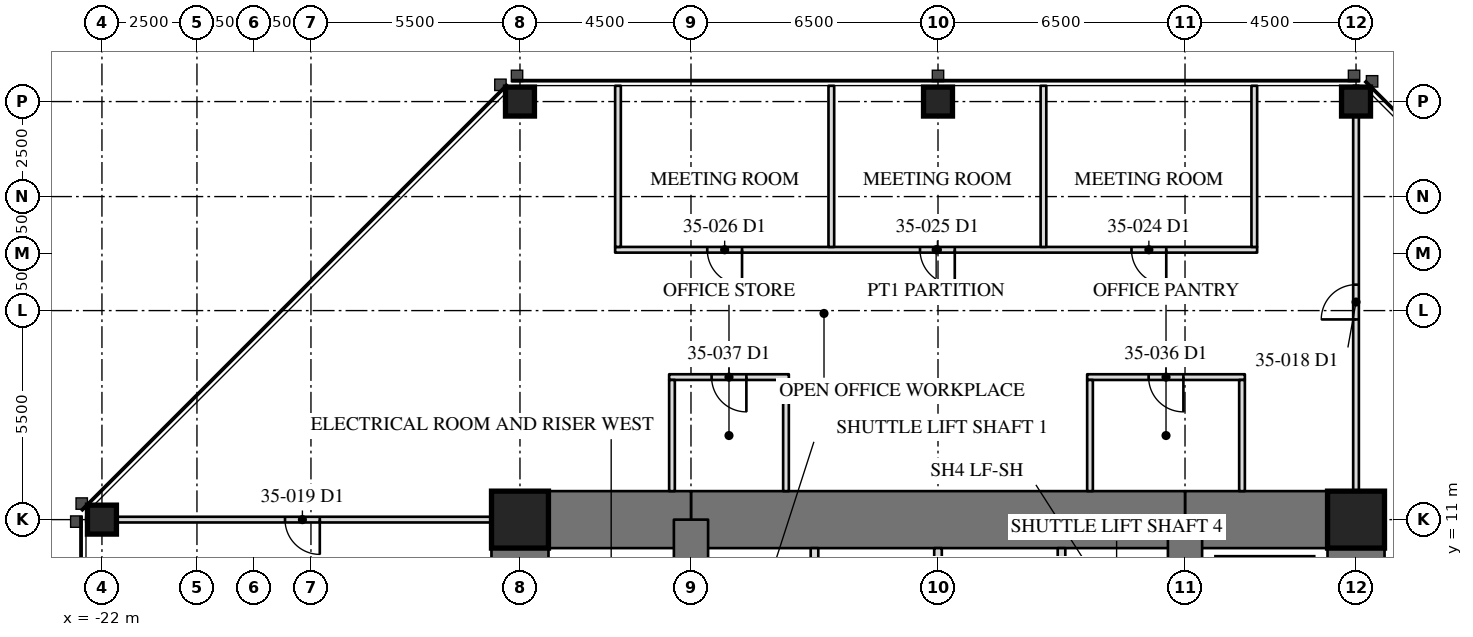
"""IFC4 building model, lengths in metres.
Left out: names, types, materials, properties, quantities, classifications, styles, units other than length and angle.
Written with IfcOpenShell. Run it as: python <this file> out.ifc"""

import sys

from ifc_helpers import new_model, si_unit, direction, frame, frame_2d, origin, origin_2d, place, context, subcontext, project, spatial, rectangle, hollow_rectangle, extrude, element, fill, save


model = new_model("IFC4")
c1 = context("Model", 3, precision=1e-05, world=origin(), true_north=direction((0.0, 1.0)))
c2 = subcontext(c1, "Body", "Model", "MODEL_VIEW")
j1 = project(units=[si_unit("LENGTHUNIT", "METRE"), si_unit("PLANEANGLEUNIT", "RADIAN")], contexts=[c1])
p1 = place(None, origin())
s1 = spatial("IfcSite", under=j1, at=p1, CompositionType="ELEMENT")
p2 = place(p1, origin())
s2 = spatial("IfcBuilding", under=s1, at=p2, CompositionType="ELEMENT")
p3 = place(p2, frame((0.0, 0.0, 150.0)))
s3 = spatial("IfcBuildingStorey", under=s2, at=p3, CompositionType="ELEMENT", Elevation=150.0)
for number, where, z_axis, x_axis in (
    (1, (11.0, 22.0, 0.0), (0.0, 0.0, 1.0), (1.0, 0.0, 0.0)),
    (2, (0.0, 22.0, 0.0), (0.0, 0.0, 1.0), (1.0, 0.0, 0.0)),
    (3, (-11.0, 22.0, 0.0), (0.0, 0.0, 1.0), (1.0, 0.0, 0.0)),
    (4, (-22.0, 11.0, 0.0), (0.0, 0.0, 1.0), (0.0, 1.0, 0.0)),
):
    element("IfcColumn", number, at=place(p3, frame(where, z_axis=z_axis, x_axis=x_axis)), inside=s3, PredefinedType="COLUMN", context=c2, shape_type="SweptSolid", body=[
        extrude(hollow_rectangle(XDim=0.762, YDim=0.762, WallThickness=0.076, at=origin_2d()), origin(), (0.0, 0.0, 1.0), 4.1),
    ])
p4 = place(p3, frame((11.0, -11.0, 0.0), z_axis=(0.0, 0.0, 1.0), x_axis=(0.0, 1.0, 0.0)))
e5 = element("IfcWall", 5, at=p4, inside=s3, PredefinedType="SHEAR", context=c2, shape_type="SweptSolid", body=[
    extrude(rectangle(XDim=22.0, YDim=1.5, at=frame_2d((11.0, 0.0))), origin(), (0.0, 0.0, 1.0), 4.1),
])
p5 = place(p4, frame((15.393, 0.0, 0.0)))
e6 = element("IfcOpeningElement", 6, at=p5, cuts=e5, PredefinedType="OPENING", context=c2, shape_type="SweptSolid", body=[
    extrude(rectangle(XDim=0.915, YDim=2.134, at=frame_2d((0.458, 1.067))), frame((0.0, 0.76, 0.0), z_axis=(0.0, -1.0, 0.0), x_axis=(1.0, 0.0, 0.0)), (0.0, 0.0, 1.0), 1.52),
])
p6 = place(p3, frame((-11.0, 11.0, 0.0), z_axis=(0.0, 0.0, 1.0), x_axis=(0.0, -1.0, 0.0)))
e7 = element("IfcWall", 7, at=p6, inside=s3, PredefinedType="SHEAR", context=c2, shape_type="SweptSolid", body=[
    extrude(rectangle(XDim=22.0, YDim=1.5, at=frame_2d((11.0, 0.0))), origin(), (0.0, 0.0, 1.0), 4.1),
])
p7 = place(p6, frame((15.393, 0.0, 0.0)))
e8 = element("IfcOpeningElement", 8, at=p7, cuts=e7, PredefinedType="OPENING", context=c2, shape_type="SweptSolid", body=[
    extrude(rectangle(XDim=0.915, YDim=2.134, at=frame_2d((0.458, 1.067))), frame((0.0, 0.76, 0.0), z_axis=(0.0, -1.0, 0.0), x_axis=(1.0, 0.0, 0.0)), (0.0, 0.0, 1.0), 1.52),
])
p8 = place(p3, frame((11.0, 11.0, 0.0), z_axis=(0.0, 0.0, 1.0), x_axis=(-1.0, 0.0, 0.0)))
e9 = element("IfcWall", 9, at=p8, inside=s3, PredefinedType="SHEAR", context=c2, shape_type="SweptSolid", body=[
    extrude(rectangle(XDim=4.5, YDim=1.5, at=frame_2d((2.25, 0.0))), origin(), (0.0, 0.0, 1.0), 4.1),
])
p9 = place(p3, frame((6.5, 11.0, 0.0), z_axis=(0.0, 0.0, 1.0), x_axis=(-1.0, 0.0, 0.0)))
e10 = element("IfcWall", 10, at=p9, inside=s3, PredefinedType="SHEAR", context=c2, shape_type="SweptSolid", body=[
    extrude(rectangle(XDim=13.0, YDim=1.5, at=frame_2d((6.5, 0.0))), origin(), (0.0, 0.0, 1.0), 4.1),
])
p10 = place(p3, frame((-6.5, 11.0, 0.0), z_axis=(0.0, 0.0, 1.0), x_axis=(-1.0, 0.0, 0.0)))
e11 = element("IfcWall", 11, at=p10, inside=s3, PredefinedType="SHEAR", context=c2, shape_type="SweptSolid", body=[
    extrude(rectangle(XDim=4.5, YDim=1.5, at=frame_2d((2.25, 0.0))), origin(), (0.0, 0.0, 1.0), 4.1),
])
for number, where, z_axis, x_axis in (
    (12, (6.5, 6.5, 0.0), (0.0, 0.0, 1.0), (0.0, 1.0, 0.0)),
    (13, (-6.5, 11.0, 0.0), (0.0, 0.0, 1.0), (0.0, -1.0, 0.0)),
):
    element("IfcWall", number, at=place(p3, frame(where, z_axis=z_axis, x_axis=x_axis)), inside=s3, PredefinedType="SHEAR", context=c2, shape_type="SweptSolid", body=[
        extrude(rectangle(XDim=4.5, YDim=0.9, at=frame_2d((2.25, 0.0))), origin(), (0.0, 0.0, 1.0), 4.1),
    ])
for number, where, z_axis, x_axis in (
    (14, (11.0, 11.0, 0.0), (0.0, 0.0, 1.0), (1.0, 0.0, 0.0)),
    (15, (-11.0, 11.0, 0.0), (0.0, 0.0, 1.0), (1.0, 0.0, 0.0)),
):
    element("IfcColumn", number, at=place(p3, frame(where, z_axis=z_axis, x_axis=x_axis)), inside=s3, PredefinedType="COLUMN", context=c2, shape_type="SweptSolid", body=[
        extrude(hollow_rectangle(XDim=1.499, YDim=1.499, WallThickness=0.102, at=origin_2d()), origin(), (0.0, 0.0, 1.0), 4.1),
    ])
for number, where, z_axis, x_axis in (
    (16, (-3.25, 6.95, 0.0), (0.0, 0.0, 1.0), (0.0, 1.0, 0.0)),
    (17, (0.0, 6.95, 0.0), (0.0, 0.0, 1.0), (0.0, 1.0, 0.0)),
    (18, (3.25, 6.95, 0.0), (0.0, 0.0, 1.0), (0.0, 1.0, 0.0)),
):
    element("IfcWall", number, at=place(p3, frame(where, z_axis=z_axis, x_axis=x_axis)), inside=s3, PredefinedType="PARTITIONING", context=c2, shape_type="SweptSolid", body=[
        extrude(rectangle(XDim=3.3, YDim=0.2, at=frame_2d((1.65, 0.0))), origin(), (0.0, 0.0, 1.0), 3.91),
    ])
p11 = place(p3, frame((11.0, 11.75, 0.0), z_axis=(0.0, 0.0, 1.0), x_axis=(0.0, 1.0, 0.0)))
e19 = element("IfcWall", 19, at=p11, inside=s3, PredefinedType="PARTITIONING", context=c2, shape_type="SweptSolid", body=[
    extrude(rectangle(XDim=10.665, YDim=0.15, at=frame_2d((5.333, 0.0))), origin(), (0.0, 0.0, 1.0), 3.326),
])
p12 = place(p11, frame((4.518, 0.0, 0.0)))
e20 = element("IfcOpeningElement", 20, at=p12, cuts=e19, PredefinedType="OPENING", context=c2, shape_type="SweptSolid", body=[
    extrude(rectangle(XDim=0.915, YDim=2.134, at=frame_2d((0.458, 1.067))), frame((0.0, 0.085, 0.0), z_axis=(0.0, -1.0, 0.0), x_axis=(1.0, 0.0, 0.0)), (0.0, 0.0, 1.0), 0.17),
])
p13 = place(p3, frame((-11.75, 11.0, 0.0), z_axis=(0.0, 0.0, 1.0), x_axis=(-1.0, 0.0, 0.0)))
e21 = element("IfcWall", 21, at=p13, inside=s3, PredefinedType="PARTITIONING", context=c2, shape_type="SweptSolid", body=[
    extrude(rectangle(XDim=10.665, YDim=0.15, at=frame_2d((5.333, 0.0))), origin(), (0.0, 0.0, 1.0), 3.326),
])
p14 = place(p13, frame((4.518, 0.0, 0.0)))
e22 = element("IfcOpeningElement", 22, at=p14, cuts=e21, PredefinedType="OPENING", context=c2, shape_type="SweptSolid", body=[
    extrude(rectangle(XDim=0.915, YDim=2.134, at=frame_2d((0.458, 1.067))), frame((0.0, 0.085, 0.0), z_axis=(0.0, -1.0, 0.0), x_axis=(1.0, 0.0, 0.0)), (0.0, 0.0, 1.0), 0.17),
])
p15 = place(p3, frame((8.398, 18.1, 0.0), z_axis=(0.0, 0.0, 1.0), x_axis=(-1.0, 0.0, 0.0)))
e23 = element("IfcWall", 23, at=p15, inside=s3, PredefinedType="PARTITIONING", context=c2, shape_type="SweptSolid", body=[
    extrude(rectangle(XDim=16.894, YDim=0.15, at=frame_2d((8.447, 0.0))), origin(), (0.0, 0.0, 1.0), 3.91),
])
p16 = place(p15, frame((2.392, 0.0, 0.0)))
e24 = element("IfcOpeningElement", 24, at=p16, cuts=e23, PredefinedType="OPENING", context=c2, shape_type="SweptSolid", body=[
    extrude(rectangle(XDim=0.915, YDim=2.134, at=frame_2d((0.458, 1.067))), frame((0.0, 0.085, 0.0), z_axis=(0.0, -1.0, 0.0), x_axis=(1.0, 0.0, 0.0)), (0.0, 0.0, 1.0), 0.17),
])
p17 = place(p15, frame((7.957, 0.0, 0.0)))
e25 = element("IfcOpeningElement", 25, at=p17, cuts=e23, PredefinedType="OPENING", context=c2, shape_type="SweptSolid", body=[
    extrude(rectangle(XDim=0.915, YDim=2.134, at=frame_2d((0.458, 1.067))), frame((0.0, 0.085, 0.0), z_axis=(0.0, -1.0, 0.0), x_axis=(1.0, 0.0, 0.0)), (0.0, 0.0, 1.0), 0.17),
])
p18 = place(p15, frame((13.554, 0.0, 0.0)))
e26 = element("IfcOpeningElement", 26, at=p18, cuts=e23, PredefinedType="OPENING", context=c2, shape_type="SweptSolid", body=[
    extrude(rectangle(XDim=0.915, YDim=2.134, at=frame_2d((0.458, 1.067))), frame((0.0, 0.085, 0.0), z_axis=(0.0, -1.0, 0.0), x_axis=(1.0, 0.0, 0.0)), (0.0, 0.0, 1.0), 0.17),
])
for number, where, z_axis, x_axis in (
    (27, (8.323, 18.175, 0.0), (0.0, 0.0, 1.0), (0.0, 1.0, 0.0)),
    (28, (2.775, 18.175, 0.0), (0.0, 0.0, 1.0), (0.0, 1.0, 0.0)),
    (29, (-2.807, 18.175, 0.0), (0.0, 0.0, 1.0), (0.0, 1.0, 0.0)),
    (30, (-8.421, 18.175, 0.0), (0.0, 0.0, 1.0), (0.0, 1.0, 0.0)),
):
    element("IfcWall", number, at=place(p3, frame(where, z_axis=z_axis, x_axis=x_axis)), inside=s3, PredefinedType="PARTITIONING", context=c2, shape_type="SweptSolid", body=[
        extrude(rectangle(XDim=4.24, YDim=0.15, at=frame_2d((2.12, 0.0))), origin(), (0.0, 0.0, 1.0), 3.91),
    ])
p19 = place(p3, frame((8.075, 14.75, 0.0), z_axis=(0.0, 0.0, 1.0), x_axis=(-1.0, 0.0, 0.0)))
e31 = element("IfcWall", 31, at=p19, inside=s3, PredefinedType="PARTITIONING", context=c2, shape_type="SweptSolid", body=[
    extrude(rectangle(XDim=4.15, YDim=0.15, at=frame_2d((2.075, 0.0))), origin(), (0.0, 0.0, 1.0), 3.91),
])
p20 = place(p19, frame((1.617, 0.0, 0.0)))
e32 = element("IfcOpeningElement", 32, at=p20, cuts=e31, PredefinedType="OPENING", context=c2, shape_type="SweptSolid", body=[
    extrude(rectangle(XDim=0.915, YDim=2.134, at=frame_2d((0.458, 1.067))), frame((0.0, 0.085, 0.0), z_axis=(0.0, -1.0, 0.0), x_axis=(1.0, 0.0, 0.0)), (0.0, 0.0, 1.0), 0.17),
])
for number, where, z_axis, x_axis in (
    (33, (8.0, 14.675, 0.0), (0.0, 0.0, 1.0), (0.0, -1.0, 0.0)),
    (34, (4.0, 14.675, 0.0), (0.0, 0.0, 1.0), (0.0, -1.0, 0.0)),
):
    element("IfcWall", number, at=place(p3, frame(where, z_axis=z_axis, x_axis=x_axis)), inside=s3, PredefinedType="PARTITIONING", context=c2, shape_type="SweptSolid", body=[
        extrude(rectangle(XDim=2.925, YDim=0.15, at=frame_2d((1.462, 0.0))), origin(), (0.0, 0.0, 1.0), 3.91),
    ])
p21 = place(p3, frame((-3.925, 14.75, 0.0), z_axis=(0.0, 0.0, 1.0), x_axis=(-1.0, 0.0, 0.0)))
e35 = element("IfcWall", 35, at=p21, inside=s3, PredefinedType="PARTITIONING", context=c2, shape_type="SweptSolid", body=[
    extrude(rectangle(XDim=3.15, YDim=0.15, at=frame_2d((1.575, 0.0))), origin(), (0.0, 0.0, 1.0), 3.91),
])
p22 = place(p21, frame((1.117, 0.0, 0.0)))
e36 = element("IfcOpeningElement", 36, at=p22, cuts=e35, PredefinedType="OPENING", context=c2, shape_type="SweptSolid", body=[
    extrude(rectangle(XDim=0.915, YDim=2.134, at=frame_2d((0.458, 1.067))), frame((0.0, 0.085, 0.0), z_axis=(0.0, -1.0, 0.0), x_axis=(1.0, 0.0, 0.0)), (0.0, 0.0, 1.0), 0.17),
])
for number, where, z_axis, x_axis in (
    (37, (-4.0, 14.675, 0.0), (0.0, 0.0, 1.0), (0.0, -1.0, 0.0)),
    (38, (-7.0, 14.675, 0.0), (0.0, 0.0, 1.0), (0.0, -1.0, 0.0)),
):
    element("IfcWall", number, at=place(p3, frame(where, z_axis=z_axis, x_axis=x_axis)), inside=s3, PredefinedType="PARTITIONING", context=c2, shape_type="SweptSolid", body=[
        extrude(rectangle(XDim=2.925, YDim=0.15, at=frame_2d((1.462, 0.0))), origin(), (0.0, 0.0, 1.0), 3.91),
    ])
p23 = place(p12, origin())
e39 = element("IfcDoor", 39, at=p23, inside=s3, OperationType="SINGLE_SWING_LEFT", PredefinedType="DOOR", context=c2, shape_type="SweptSolid", body=[
    extrude(rectangle(XDim=0.915, YDim=2.134, at=frame_2d((0.458, 1.067))), frame((0.0, 0.025, 0.0), z_axis=(0.0, -1.0, 0.0), x_axis=(1.0, 0.0, 0.0)), (0.0, 0.0, 1.0), 0.05),
])
fill(e20, e39)
p24 = place(p14, origin())
e40 = element("IfcDoor", 40, at=p24, inside=s3, OperationType="SINGLE_SWING_LEFT", PredefinedType="DOOR", context=c2, shape_type="SweptSolid", body=[
    extrude(rectangle(XDim=0.915, YDim=2.134, at=frame_2d((0.458, 1.067))), frame((0.0, 0.025, 0.0), z_axis=(0.0, -1.0, 0.0), x_axis=(1.0, 0.0, 0.0)), (0.0, 0.0, 1.0), 0.05),
])
fill(e22, e40)
p25 = place(p16, origin())
e41 = element("IfcDoor", 41, at=p25, inside=s3, OperationType="SINGLE_SWING_LEFT", PredefinedType="DOOR", context=c2, shape_type="SweptSolid", body=[
    extrude(rectangle(XDim=0.915, YDim=2.134, at=frame_2d((0.458, 1.067))), frame((0.0, 0.025, 0.0), z_axis=(0.0, -1.0, 0.0), x_axis=(1.0, 0.0, 0.0)), (0.0, 0.0, 1.0), 0.05),
])
fill(e24, e41)
p26 = place(p17, origin())
e42 = element("IfcDoor", 42, at=p26, inside=s3, OperationType="SINGLE_SWING_LEFT", PredefinedType="DOOR", context=c2, shape_type="SweptSolid", body=[
    extrude(rectangle(XDim=0.915, YDim=2.134, at=frame_2d((0.458, 1.067))), frame((0.0, 0.025, 0.0), z_axis=(0.0, -1.0, 0.0), x_axis=(1.0, 0.0, 0.0)), (0.0, 0.0, 1.0), 0.05),
])
fill(e25, e42)
p27 = place(p18, origin())
e43 = element("IfcDoor", 43, at=p27, inside=s3, OperationType="SINGLE_SWING_LEFT", PredefinedType="DOOR", context=c2, shape_type="SweptSolid", body=[
    extrude(rectangle(XDim=0.915, YDim=2.134, at=frame_2d((0.458, 1.067))), frame((0.0, 0.025, 0.0), z_axis=(0.0, -1.0, 0.0), x_axis=(1.0, 0.0, 0.0)), (0.0, 0.0, 1.0), 0.05),
])
fill(e26, e43)
p28 = place(p20, origin())
e44 = element("IfcDoor", 44, at=p28, inside=s3, OperationType="SINGLE_SWING_LEFT", PredefinedType="DOOR", context=c2, shape_type="SweptSolid", body=[
    extrude(rectangle(XDim=0.915, YDim=2.134, at=frame_2d((0.458, 1.067))), frame((0.0, 0.025, 0.0), z_axis=(0.0, -1.0, 0.0), x_axis=(1.0, 0.0, 0.0)), (0.0, 0.0, 1.0), 0.05),
])
fill(e32, e44)
p29 = place(p22, origin())
e45 = element("IfcDoor", 45, at=p29, inside=s3, OperationType="SINGLE_SWING_LEFT", PredefinedType="DOOR", context=c2, shape_type="SweptSolid", body=[
    extrude(rectangle(XDim=0.915, YDim=2.134, at=frame_2d((0.458, 1.067))), frame((0.0, 0.025, 0.0), z_axis=(0.0, -1.0, 0.0), x_axis=(1.0, 0.0, 0.0)), (0.0, 0.0, 1.0), 0.05),
])
fill(e36, e45)
save(model, sys.argv[1])
